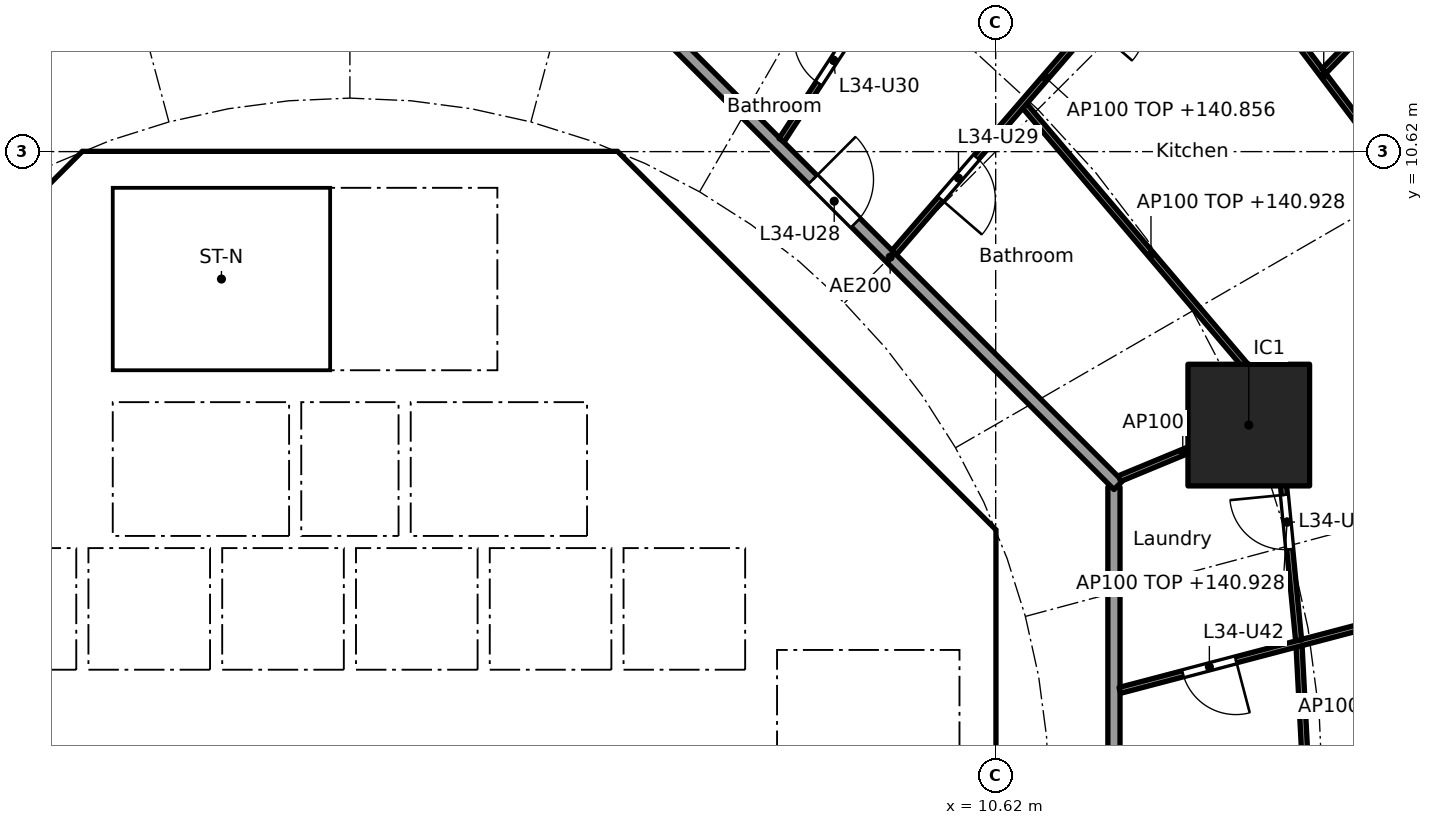
"""IFC4 building model, lengths in metres.
Left out: names, types, materials, properties, quantities, classifications, styles, units other than length and angle.
Written with IfcOpenShell. Run it as: python <this file> out.ifc"""

import sys

from ifc_helpers import new_model, si_unit, direction, frame, frame_2d, origin, origin_2d, place, context, subcontext, project, spatial, polyline, rectangle, outline, extrude, element, fill, save


model = new_model("IFC4")
c1 = context("Model", 3, precision=1e-05, world=origin(), true_north=direction((0.0, 1.0)))
c2 = subcontext(c1, "Body", "Model", "MODEL_VIEW")
j1 = project(units=[si_unit("LENGTHUNIT", "METRE"), si_unit("PLANEANGLEUNIT", "RADIAN")], contexts=[c1])
p1 = place(None, origin())
s1 = spatial("IfcSite", under=j1, at=p1, CompositionType="ELEMENT")
p2 = place(p1, origin())
s2 = spatial("IfcBuilding", under=s1, at=p2, CompositionType="ELEMENT")
p3 = place(p2, frame((0.0, 0.0, 138.1)))
s3 = spatial("IfcBuildingStorey", under=s2, at=p3, CompositionType="ELEMENT", Elevation=138.1)
p4 = place(p3, frame((14.782, 6.123, 0.0), z_axis=(0.0, 0.0, 1.0), x_axis=(1.0, 0.0, 0.0)))
e1 = element("IfcColumn", 1, at=p4, inside=s3, PredefinedType="COLUMN", context=c2, shape_type="SweptSolid", body=[
    extrude(rectangle(XDim=2.0, YDim=2.0, at=origin_2d()), origin(), (0.0, 0.0, 1.0), 3.7),
])
p5 = place(p3, frame((9.988, 4.613, 0.0), z_axis=(0.0, 0.0, 1.0), x_axis=(-0.707106781187, 0.707106781187, 0.0)))
e2 = element("IfcWall", 2, at=p5, inside=s3, PredefinedType="SHEAR", context=c2, shape_type="SweptSolid", body=[
    extrude(rectangle(XDim=7.602, YDim=0.6, at=frame_2d((3.801, 0.0))), origin(), (0.0, 0.0, 1.0), 3.44),
])
p6 = place(p5, frame((3.201, 0.0, 0.0)))
e3 = element("IfcOpeningElement", 3, at=p6, cuts=e2, PredefinedType="OPENING", context=c2, shape_type="SweptSolid", body=[
    extrude(rectangle(XDim=1.2, YDim=2.1, at=frame_2d((0.6, 1.05))), frame((0.0, 0.31, 0.0), z_axis=(0.0, -1.0, 0.0), x_axis=(1.0, 0.0, 0.0)), (0.0, 0.0, 1.0), 0.62),
])
p7 = place(p3, frame((-4.613, 9.988, 0.0), z_axis=(0.0, 0.0, 1.0), x_axis=(-0.707106781187, -0.707106781187, 0.0)))
e4 = element("IfcWall", 4, at=p7, inside=s3, PredefinedType="SHEAR", context=c2, shape_type="SweptSolid", body=[
    extrude(rectangle(XDim=7.602, YDim=0.6, at=frame_2d((3.801, 0.0))), origin(), (0.0, 0.0, 1.0), 3.44),
])
p8 = place(p7, frame((0.351, 0.0, 0.0)))
e5 = element("IfcOpeningElement", 5, at=p8, cuts=e4, PredefinedType="OPENING", context=c2, shape_type="SweptSolid", body=[
    extrude(rectangle(XDim=1.1, YDim=2.1, at=frame_2d((0.55, 1.05))), frame((0.0, 0.31, 0.0), z_axis=(0.0, -1.0, 0.0), x_axis=(1.0, 0.0, 0.0)), (0.0, 0.0, 1.0), 0.62),
])
p9 = place(p3, frame((4.0, 4.3, 0.0), z_axis=(0.0, 0.0, 1.0), x_axis=(0.0, 1.0, 0.0)))
e6 = element("IfcWall", 6, at=p9, inside=s3, PredefinedType="SOLIDWALL", context=c2, shape_type="SweptSolid", body=[
    extrude(rectangle(XDim=2.2, YDim=0.2, at=frame_2d((1.1, 0.0))), origin(), (0.0, 0.0, 1.0), 3.44),
])
p10 = place(p9, frame((0.55, 0.0, 0.0)))
e7 = element("IfcOpeningElement", 7, at=p10, cuts=e6, PredefinedType="OPENING", context=c2, shape_type="SweptSolid", body=[
    extrude(rectangle(XDim=1.1, YDim=2.1, at=frame_2d((0.55, 1.05))), frame((0.0, 0.11, 0.0), z_axis=(0.0, -1.0, 0.0), x_axis=(1.0, 0.0, 0.0)), (0.0, 0.0, 1.0), 0.22),
])
p11 = place(p3, frame((-4.0, 4.3, 0.0), z_axis=(0.0, 0.0, 1.0), x_axis=(0.0, 1.0, 0.0)))
e8 = element("IfcWall", 8, at=p11, inside=s3, PredefinedType="SOLIDWALL", context=c2, shape_type="SweptSolid", body=[
    extrude(rectangle(XDim=2.2, YDim=0.2, at=frame_2d((1.1, 0.0))), origin(), (0.0, 0.0, 1.0), 3.44),
])
p12 = place(p11, frame((0.55, 0.0, 0.0)))
e9 = element("IfcOpeningElement", 9, at=p12, cuts=e8, PredefinedType="OPENING", context=c2, shape_type="SweptSolid", body=[
    extrude(rectangle(XDim=1.1, YDim=2.1, at=frame_2d((0.55, 1.05))), frame((0.0, 0.11, 0.0), z_axis=(0.0, -1.0, 0.0), x_axis=(1.0, 0.0, 0.0)), (0.0, 0.0, 1.0), 0.22),
])
p13 = place(p3, frame((-6.7, 2.0, 0.0), z_axis=(0.0, 0.0, 1.0), x_axis=(1.0, 0.0, 0.0)))
e10 = element("IfcWall", 10, at=p13, inside=s3, PredefinedType="SOLIDWALL", context=c2, shape_type="SweptSolid", body=[
    extrude(rectangle(XDim=13.4, YDim=0.2, at=frame_2d((6.7, 0.0))), origin(), (0.0, 0.0, 1.0), 3.44),
])
p14 = place(p13, frame((0.65, 0.0, 0.0)))
e11 = element("IfcOpeningElement", 11, at=p14, cuts=e10, PredefinedType="OPENING", context=c2, shape_type="SweptSolid", body=[
    extrude(rectangle(XDim=1.1, YDim=2.1, at=frame_2d((0.55, 1.05))), frame((0.0, 0.11, 0.0), z_axis=(0.0, -1.0, 0.0), x_axis=(1.0, 0.0, 0.0)), (0.0, 0.0, 1.0), 0.22),
])
p15 = place(p13, frame((2.85, 0.0, 0.0)))
e12 = element("IfcOpeningElement", 12, at=p15, cuts=e10, PredefinedType="OPENING", context=c2, shape_type="SweptSolid", body=[
    extrude(rectangle(XDim=1.1, YDim=2.1, at=frame_2d((0.55, 1.05))), frame((0.0, 0.11, 0.0), z_axis=(0.0, -1.0, 0.0), x_axis=(1.0, 0.0, 0.0)), (0.0, 0.0, 1.0), 0.22),
])
p16 = place(p13, frame((5.05, 0.0, 0.0)))
e13 = element("IfcOpeningElement", 13, at=p16, cuts=e10, PredefinedType="OPENING", context=c2, shape_type="SweptSolid", body=[
    extrude(rectangle(XDim=1.1, YDim=2.1, at=frame_2d((0.55, 1.05))), frame((0.0, 0.11, 0.0), z_axis=(0.0, -1.0, 0.0), x_axis=(1.0, 0.0, 0.0)), (0.0, 0.0, 1.0), 0.22),
])
p17 = place(p3, frame((6.7, 4.0, 0.0), z_axis=(0.0, 0.0, 1.0), x_axis=(1.0, 0.0, 0.0)))
e14 = element("IfcWall", 14, at=p17, inside=s3, PredefinedType="SOLIDWALL", context=c2, shape_type="SweptSolid", body=[
    extrude(rectangle(XDim=3.325, YDim=0.2, at=frame_2d((1.662, 0.0))), origin(), (0.0, 0.0, 1.0), 3.44),
])
p18 = place(p17, frame((1.25, 0.0, 0.0)))
e15 = element("IfcOpeningElement", 15, at=p18, cuts=e14, PredefinedType="OPENING", context=c2, shape_type="SweptSolid", body=[
    extrude(rectangle(XDim=1.1, YDim=2.1, at=frame_2d((0.55, 1.05))), frame((0.0, 0.11, 0.0), z_axis=(0.0, -1.0, 0.0), x_axis=(1.0, 0.0, 0.0)), (0.0, 0.0, 1.0), 0.22),
])
p19 = place(p3, frame((4.0, 7.025, 0.0), z_axis=(0.0, 0.0, 1.0), x_axis=(0.0, 1.0, 0.0)))
e16 = element("IfcWall", 16, at=p19, inside=s3, PredefinedType="SOLIDWALL", context=c2, shape_type="SweptSolid", body=[
    extrude(rectangle(XDim=3.0, YDim=0.2, at=frame_2d((1.5, 0.0))), origin(), (0.0, 0.0, 1.0), 3.44),
])
p20 = place(p19, frame((0.925, 0.0, 0.0)))
e17 = element("IfcOpeningElement", 17, at=p20, cuts=e16, PredefinedType="OPENING", context=c2, shape_type="SweptSolid", body=[
    extrude(rectangle(XDim=1.1, YDim=2.1, at=frame_2d((0.55, 1.05))), frame((0.0, 0.11, 0.0), z_axis=(0.0, -1.0, 0.0), x_axis=(1.0, 0.0, 0.0)), (0.0, 0.0, 1.0), 0.22),
])
p21 = place(p3, origin())
e18 = element("IfcWall", 18, at=p21, inside=s3, PredefinedType="SHEAR", context=c2, shape_type="SweptSolid", body=[
    extrude(outline(polyline([(-4.152, 10.025), (-4.401, 9.776), (-4.825, 10.2), (-4.401, 10.625), (4.401, 10.625), (4.825, 10.2), (4.401, 9.776), (4.152, 10.025), (-4.152, 10.025)])), origin(), (0.0, 0.0, 1.0), 3.44),
])
p22 = place(p3, origin())
e19 = element("IfcWall", 19, at=p22, inside=s3, PredefinedType="SHEAR", context=c2, shape_type="SweptSolid", body=[
    extrude(outline(polyline([(9.776, -4.401), (10.025, -4.152), (10.025, -3.801), (10.025, 4.152), (9.776, 4.401), (10.2, 4.825), (10.625, 4.401), (10.625, -4.401), (10.2, -4.825), (9.776, -4.401)])), origin(), (0.0, 0.0, 1.0), 3.44),
])
for number, where, z_axis, x_axis in (
    (20, (-0.9, 4.3, 0.0), (0.0, 0.0, 1.0), (0.0, 1.0, 0.0)),
    (21, (0.9, 4.3, 0.0), (0.0, 0.0, 1.0), (0.0, 1.0, 0.0)),
):
    element("IfcWall", number, at=place(p3, frame(where, z_axis=z_axis, x_axis=x_axis)), inside=s3, PredefinedType="SOLIDWALL", context=c2, shape_type="SweptSolid", body=[
        extrude(rectangle(XDim=2.2, YDim=0.2, at=frame_2d((1.1, 0.0))), origin(), (0.0, 0.0, 1.0), 3.44),
    ])
p23 = place(p3, origin())
e22 = element("IfcWall", 22, at=p23, inside=s3, PredefinedType="SOLIDWALL", context=c2, shape_type="SweptSolid", body=[
    extrude(outline(polyline([(-6.5, 2.1), (-6.7, 2.1), (-6.7, 4.3), (6.7, 4.3), (6.7, 2.1), (6.5, 2.1), (6.5, 4.1), (4.5, 4.1), (4.5, 2.1), (4.3, 2.1), (4.3, 4.1), (2.3, 4.1), (2.3, 2.1), (2.1, 2.1), (2.1, 4.1), (0.1, 4.1), (0.1, 2.1), (-0.1, 2.1), (-0.1, 4.1), (-2.1, 4.1), (-2.1, 2.1), (-2.3, 2.1), (-2.3, 4.1), (-4.3, 4.1), (-4.3, 2.1), (-4.5, 2.1), (-4.5, 4.1), (-6.5, 4.1), (-6.5, 2.1)])), origin(), (0.0, 0.0, 1.0), 3.44),
])
p24 = place(p3, origin())
e23 = element("IfcWall", 23, at=p24, inside=s3, PredefinedType="SOLIDWALL", context=c2, shape_type="SweptSolid", body=[
    extrude(outline(polyline([(-3.9, 7.025), (-4.1, 7.025), (-4.1, 10.025), (-3.9, 10.025), (-3.9, 7.025)])), origin(), (0.0, 0.0, 1.0), 3.44),
])
p25 = place(p3, origin())
e24 = element("IfcWall", 24, at=p25, inside=s3, PredefinedType="SOLIDWALL", context=c2, shape_type="SweptSolid", body=[
    extrude(outline(polyline([(4.1, 6.5), (-4.1, 6.5), (-4.1, 7.025), (4.1, 7.025), (4.1, 6.5)])), origin(), (0.0, 0.0, 1.0), 3.44),
])
p26 = place(p3, origin())
e25 = element("IfcWall", 25, at=p26, inside=s3, PredefinedType="SOLIDWALL", context=c2, shape_type="SweptSolid", body=[
    extrude(outline(polyline([(7.025, -3.9), (6.7, -3.9), (6.7, 3.9), (7.025, 3.9), (7.025, -3.9)])), origin(), (0.0, 0.0, 1.0), 3.44),
])
p27 = place(p3, frame((12.565, -5.104, 0.0), z_axis=(0.0, 0.0, 1.0), x_axis=(0.0, 1.0, 0.0)))
e26 = element("IfcWall", 26, at=p27, inside=s3, PredefinedType="PARTITIONING", context=c2, shape_type="SweptSolid", body=[
    extrude(rectangle(XDim=10.209, YDim=0.2, at=frame_2d((5.104, 0.0))), origin(), (0.0, 0.0, 1.0), 3.44),
])
p28 = place(p3, frame((12.635, 5.134, 0.0), z_axis=(0.0, 0.0, 1.0), x_axis=(-0.707106781187, 0.707106781187, 0.0)))
e27 = element("IfcWall", 27, at=p28, inside=s3, PredefinedType="PARTITIONING", context=c2, shape_type="SweptSolid", body=[
    extrude(rectangle(XDim=10.609, YDim=0.2, at=frame_2d((5.305, 0.0))), origin(), (0.0, 0.0, 1.0), 3.44),
])
p29 = place(p28, frame((6.106, 0.0, 0.0)))
e28 = element("IfcOpeningElement", 28, at=p29, cuts=e27, PredefinedType="OPENING", context=c2, shape_type="SweptSolid", body=[
    extrude(rectangle(XDim=1.0, YDim=2.1, at=frame_2d((0.5, 1.05))), frame((0.0, 0.11, 0.0), z_axis=(0.0, -1.0, 0.0), x_axis=(1.0, 0.0, 0.0)), (0.0, 0.0, 1.0), 0.22),
])
p30 = place(p3, frame((15.853, -2.158, 0.0), z_axis=(0.0, 0.0, 1.0), x_axis=(-0.052509224895, 0.998620439056, 0.0)))
e29 = element("IfcWall", 29, at=p30, inside=s3, PredefinedType="PARTITIONING", context=c2, shape_type="SweptSolid", body=[
    extrude(rectangle(XDim=4.649, YDim=0.1, at=frame_2d((2.325, 0.0))), origin(), (0.0, 0.0, 1.0), 2.828),
])
p31 = place(p3, frame((12.661, 1.76, 0.0), z_axis=(0.0, 0.0, 1.0), x_axis=(0.967120304949, 0.254319318488, 0.0)))
e30 = element("IfcWall", 30, at=p31, inside=s3, PredefinedType="PARTITIONING", context=c2, shape_type="SweptSolid", body=[
    extrude(rectangle(XDim=10.499, YDim=0.1, at=frame_2d((5.25, 0.0))), origin(), (0.0, 0.0, 1.0), 2.756),
])
p32 = place(p31, frame((4.634, 0.0, 0.0)))
e31 = element("IfcOpeningElement", 31, at=p32, cuts=e30, PredefinedType="OPENING", context=c2, shape_type="SweptSolid", body=[
    extrude(rectangle(XDim=0.9, YDim=2.1, at=frame_2d((0.45, 1.05))), frame((0.0, 0.06, 0.0), z_axis=(0.0, -1.0, 0.0), x_axis=(1.0, 0.0, 0.0)), (0.0, 0.0, 1.0), 0.12),
])
p33 = place(p31, frame((1.073, 0.0, 0.0)))
e32 = element("IfcOpeningElement", 32, at=p33, cuts=e30, PredefinedType="OPENING", context=c2, shape_type="SweptSolid", body=[
    extrude(rectangle(XDim=0.9, YDim=2.1, at=frame_2d((0.45, 1.05))), frame((0.0, 0.06, 0.0), z_axis=(0.0, -1.0, 0.0), x_axis=(1.0, 0.0, 0.0)), (0.0, 0.0, 1.0), 0.12),
])
p34 = place(p3, frame((15.602, 2.584, 0.0), z_axis=(0.0, 0.0, 1.0), x_axis=(-0.097207196705, 0.995264166394, 0.0)))
e33 = element("IfcWall", 33, at=p34, inside=s3, PredefinedType="PARTITIONING", context=c2, shape_type="SweptSolid", body=[
    extrude(rectangle(XDim=3.906, YDim=0.1, at=frame_2d((1.953, 0.0))), origin(), (0.0, 0.0, 1.0), 2.828),
])
p35 = place(p34, frame((1.503, 0.0, 0.0)))
e34 = element("IfcOpeningElement", 34, at=p35, cuts=e33, PredefinedType="OPENING", context=c2, shape_type="SweptSolid", body=[
    extrude(rectangle(XDim=0.9, YDim=2.1, at=frame_2d((0.45, 1.05))), frame((0.0, 0.06, 0.0), z_axis=(0.0, -1.0, 0.0), x_axis=(1.0, 0.0, 0.0)), (0.0, 0.0, 1.0), 0.12),
])
p36 = place(p3, frame((12.657, 5.243, 0.0), z_axis=(0.0, 0.0, 1.0), x_axis=(0.923864733477, 0.382719158442, 0.0)))
e35 = element("IfcWall", 35, at=p36, inside=s3, PredefinedType="PARTITIONING", context=c2, shape_type="SweptSolid", body=[
    extrude(rectangle(XDim=2.25, YDim=0.1, at=frame_2d((1.125, 0.0))), origin(), (0.0, 0.0, 1.0), 3.44),
])
p37 = place(p3, frame((15.25, 6.483, 0.0), z_axis=(0.0, 0.0, 1.0), x_axis=(-0.647379829894, 0.762167537912, 0.0)))
e36 = element("IfcWall", 36, at=p37, inside=s3, PredefinedType="PARTITIONING", context=c2, shape_type="SweptSolid", body=[
    extrude(rectangle(XDim=6.413, YDim=0.1, at=frame_2d((3.206, 0.0))), origin(), (0.0, 0.0, 1.0), 2.828),
])
p38 = place(p3, frame((18.106, 9.098, 0.0), z_axis=(0.0, 0.0, 1.0), x_axis=(-0.602393803621, 0.798199038686, 0.0)))
e37 = element("IfcWall", 37, at=p38, inside=s3, PredefinedType="PARTITIONING", context=c2, shape_type="SweptSolid", body=[
    extrude(rectangle(XDim=6.944, YDim=0.1, at=frame_2d((3.472, 0.0))), origin(), (0.0, 0.0, 1.0), 2.828),
])
p39 = place(p3, frame((16.02, 11.946, 0.0), z_axis=(0.0, 0.0, 1.0), x_axis=(0.697741638446, 0.71634949988, 0.0)))
e38 = element("IfcWall", 38, at=p39, inside=s3, PredefinedType="PARTITIONING", context=c2, shape_type="SweptSolid", body=[
    extrude(rectangle(XDim=4.592, YDim=0.1, at=frame_2d((2.296, 0.0))), origin(), (0.0, 0.0, 1.0), 2.905),
])
p40 = place(p3, frame((8.95, 8.96, 0.0), z_axis=(0.0, 0.0, 1.0), x_axis=(0.653829477183, 0.756641932995, 0.0)))
e39 = element("IfcWall", 39, at=p40, inside=s3, PredefinedType="PARTITIONING", context=c2, shape_type="SweptSolid", body=[
    extrude(rectangle(XDim=7.611, YDim=0.1, at=frame_2d((3.805, 0.0))), origin(), (0.0, 0.0, 1.0), 2.756),
])
p41 = place(p40, frame((1.168, 0.0, 0.0)))
e40 = element("IfcOpeningElement", 40, at=p41, cuts=e39, PredefinedType="OPENING", context=c2, shape_type="SweptSolid", body=[
    extrude(rectangle(XDim=0.9, YDim=2.1, at=frame_2d((0.45, 1.05))), frame((0.0, 0.06, 0.0), z_axis=(0.0, -1.0, 0.0), x_axis=(1.0, 0.0, 0.0)), (0.0, 0.0, 1.0), 0.12),
])
p42 = place(p40, frame((4.948, 0.0, 0.0)))
e41 = element("IfcOpeningElement", 41, at=p42, cuts=e39, PredefinedType="OPENING", context=c2, shape_type="SweptSolid", body=[
    extrude(rectangle(XDim=0.9, YDim=2.1, at=frame_2d((0.45, 1.05))), frame((0.0, 0.06, 0.0), z_axis=(0.0, -1.0, 0.0), x_axis=(1.0, 0.0, 0.0)), (0.0, 0.0, 1.0), 0.12),
])
p43 = place(p3, frame((7.099, 10.808, 0.0), z_axis=(0.0, 0.0, 1.0), x_axis=(0.546709757921, 0.837322184463, 0.0)))
e42 = element("IfcWall", 42, at=p43, inside=s3, PredefinedType="PARTITIONING", context=c2, shape_type="SweptSolid", body=[
    extrude(rectangle(XDim=3.134, YDim=0.1, at=frame_2d((1.567, 0.0))), origin(), (0.0, 0.0, 1.0), 2.756),
])
p44 = place(p43, frame((1.117, 0.0, 0.0)))
e43 = element("IfcOpeningElement", 43, at=p44, cuts=e42, PredefinedType="OPENING", context=c2, shape_type="SweptSolid", body=[
    extrude(rectangle(XDim=0.9, YDim=2.1, at=frame_2d((0.45, 1.05))), frame((0.0, 0.06, 0.0), z_axis=(0.0, -1.0, 0.0), x_axis=(1.0, 0.0, 0.0)), (0.0, 0.0, 1.0), 0.12),
])
p45 = place(p15, origin())
e44 = element("IfcDoor", 44, at=p45, inside=s3, OperationType="DOUBLE_DOOR_SLIDING", PredefinedType="DOOR", context=c2, shape_type="SweptSolid", body=[
    extrude(rectangle(XDim=1.1, YDim=2.1, at=frame_2d((0.55, 1.05))), frame((0.0, 0.025, 0.0), z_axis=(0.0, -1.0, 0.0), x_axis=(1.0, 0.0, 0.0)), (0.0, 0.0, 1.0), 0.05),
])
fill(e12, e44)
p46 = place(p16, origin())
e45 = element("IfcDoor", 45, at=p46, inside=s3, OperationType="DOUBLE_DOOR_SLIDING", PredefinedType="DOOR", context=c2, shape_type="SweptSolid", body=[
    extrude(rectangle(XDim=1.1, YDim=2.1, at=frame_2d((0.55, 1.05))), frame((0.0, 0.025, 0.0), z_axis=(0.0, -1.0, 0.0), x_axis=(1.0, 0.0, 0.0)), (0.0, 0.0, 1.0), 0.05),
])
fill(e13, e45)
p47 = place(p10, origin())
e46 = element("IfcDoor", 46, at=p47, inside=s3, OperationType="DOUBLE_DOOR_SLIDING", PredefinedType="DOOR", context=c2, shape_type="SweptSolid", body=[
    extrude(rectangle(XDim=1.1, YDim=2.1, at=frame_2d((0.55, 1.05))), frame((0.0, 0.025, 0.0), z_axis=(0.0, -1.0, 0.0), x_axis=(1.0, 0.0, 0.0)), (0.0, 0.0, 1.0), 0.05),
])
fill(e7, e46)
p48 = place(p12, origin())
e47 = element("IfcDoor", 47, at=p48, inside=s3, OperationType="DOUBLE_DOOR_SLIDING", PredefinedType="DOOR", context=c2, shape_type="SweptSolid", body=[
    extrude(rectangle(XDim=1.1, YDim=2.1, at=frame_2d((0.55, 1.05))), frame((0.0, 0.025, 0.0), z_axis=(0.0, -1.0, 0.0), x_axis=(1.0, 0.0, 0.0)), (0.0, 0.0, 1.0), 0.05),
])
fill(e9, e47)
p49 = place(p18, frame((1.1, 0.0, 0.0), x_axis=(-1.0, 0.0, 0.0)))
e48 = element("IfcDoor", 48, at=p49, inside=s3, OperationType="SINGLE_SWING_LEFT", PredefinedType="DOOR", context=c2, shape_type="SweptSolid", body=[
    extrude(rectangle(XDim=1.1, YDim=2.1, at=frame_2d((0.55, 1.05))), frame((0.0, 0.025, 0.0), z_axis=(0.0, -1.0, 0.0), x_axis=(1.0, 0.0, 0.0)), (0.0, 0.0, 1.0), 0.05),
])
fill(e15, e48)
p50 = place(p20, origin())
e49 = element("IfcDoor", 49, at=p50, inside=s3, OperationType="SINGLE_SWING_RIGHT", PredefinedType="DOOR", context=c2, shape_type="SweptSolid", body=[
    extrude(rectangle(XDim=1.1, YDim=2.1, at=frame_2d((0.55, 1.05))), frame((0.0, 0.025, 0.0), z_axis=(0.0, -1.0, 0.0), x_axis=(1.0, 0.0, 0.0)), (0.0, 0.0, 1.0), 0.05),
])
fill(e17, e49)
p51 = place(p6, origin())
e50 = element("IfcDoor", 50, at=p51, inside=s3, OperationType="SINGLE_SWING_RIGHT", PredefinedType="DOOR", context=c2, shape_type="SweptSolid", body=[
    extrude(rectangle(XDim=1.2, YDim=2.1, at=frame_2d((0.6, 1.05))), frame((0.0, 0.025, 0.0), z_axis=(0.0, -1.0, 0.0), x_axis=(1.0, 0.0, 0.0)), (0.0, 0.0, 1.0), 0.05),
])
fill(e3, e50)
p52 = place(p8, origin())
e51 = element("IfcDoor", 51, at=p52, inside=s3, OperationType="SINGLE_SWING_RIGHT", PredefinedType="DOOR", context=c2, shape_type="SweptSolid", body=[
    extrude(rectangle(XDim=1.1, YDim=2.1, at=frame_2d((0.55, 1.05))), frame((0.0, 0.025, 0.0), z_axis=(0.0, -1.0, 0.0), x_axis=(1.0, 0.0, 0.0)), (0.0, 0.0, 1.0), 0.05),
])
fill(e5, e51)
p53 = place(p29, frame((1.0, 0.0, 0.0), x_axis=(-1.0, 0.0, 0.0)))
e52 = element("IfcDoor", 52, at=p53, inside=s3, OperationType="SINGLE_SWING_LEFT", PredefinedType="DOOR", context=c2, shape_type="SweptSolid", body=[
    extrude(rectangle(XDim=1.0, YDim=2.1, at=frame_2d((0.5, 1.05))), frame((0.0, 0.025, 0.0), z_axis=(0.0, -1.0, 0.0), x_axis=(1.0, 0.0, 0.0)), (0.0, 0.0, 1.0), 0.05),
])
fill(e28, e52)
p54 = place(p41, frame((0.9, 0.0, 0.0), x_axis=(-1.0, 0.0, 0.0)))
e53 = element("IfcDoor", 53, at=p54, inside=s3, OperationType="SINGLE_SWING_RIGHT", PredefinedType="DOOR", context=c2, shape_type="SweptSolid", body=[
    extrude(rectangle(XDim=0.9, YDim=2.1, at=frame_2d((0.45, 1.05))), frame((0.0, 0.025, 0.0), z_axis=(0.0, -1.0, 0.0), x_axis=(1.0, 0.0, 0.0)), (0.0, 0.0, 1.0), 0.05),
])
fill(e40, e53)
p55 = place(p44, origin())
e54 = element("IfcDoor", 54, at=p55, inside=s3, OperationType="SINGLE_SWING_RIGHT", PredefinedType="DOOR", context=c2, shape_type="SweptSolid", body=[
    extrude(rectangle(XDim=0.9, YDim=2.1, at=frame_2d((0.45, 1.05))), frame((0.0, 0.025, 0.0), z_axis=(0.0, -1.0, 0.0), x_axis=(1.0, 0.0, 0.0)), (0.0, 0.0, 1.0), 0.05),
])
fill(e43, e54)
p56 = place(p35, origin())
e55 = element("IfcDoor", 55, at=p56, inside=s3, OperationType="SINGLE_SWING_RIGHT", PredefinedType="DOOR", context=c2, shape_type="SweptSolid", body=[
    extrude(rectangle(XDim=0.9, YDim=2.1, at=frame_2d((0.45, 1.05))), frame((0.0, 0.025, 0.0), z_axis=(0.0, -1.0, 0.0), x_axis=(1.0, 0.0, 0.0)), (0.0, 0.0, 1.0), 0.05),
])
fill(e34, e55)
p57 = place(p33, frame((0.9, 0.0, 0.0), x_axis=(-1.0, 0.0, 0.0)))
e56 = element("IfcDoor", 56, at=p57, inside=s3, OperationType="SINGLE_SWING_LEFT", PredefinedType="DOOR", context=c2, shape_type="SweptSolid", body=[
    extrude(rectangle(XDim=0.9, YDim=2.1, at=frame_2d((0.45, 1.05))), frame((0.0, 0.025, 0.0), z_axis=(0.0, -1.0, 0.0), x_axis=(1.0, 0.0, 0.0)), (0.0, 0.0, 1.0), 0.05),
])
fill(e32, e56)
save(model, sys.argv[1])
